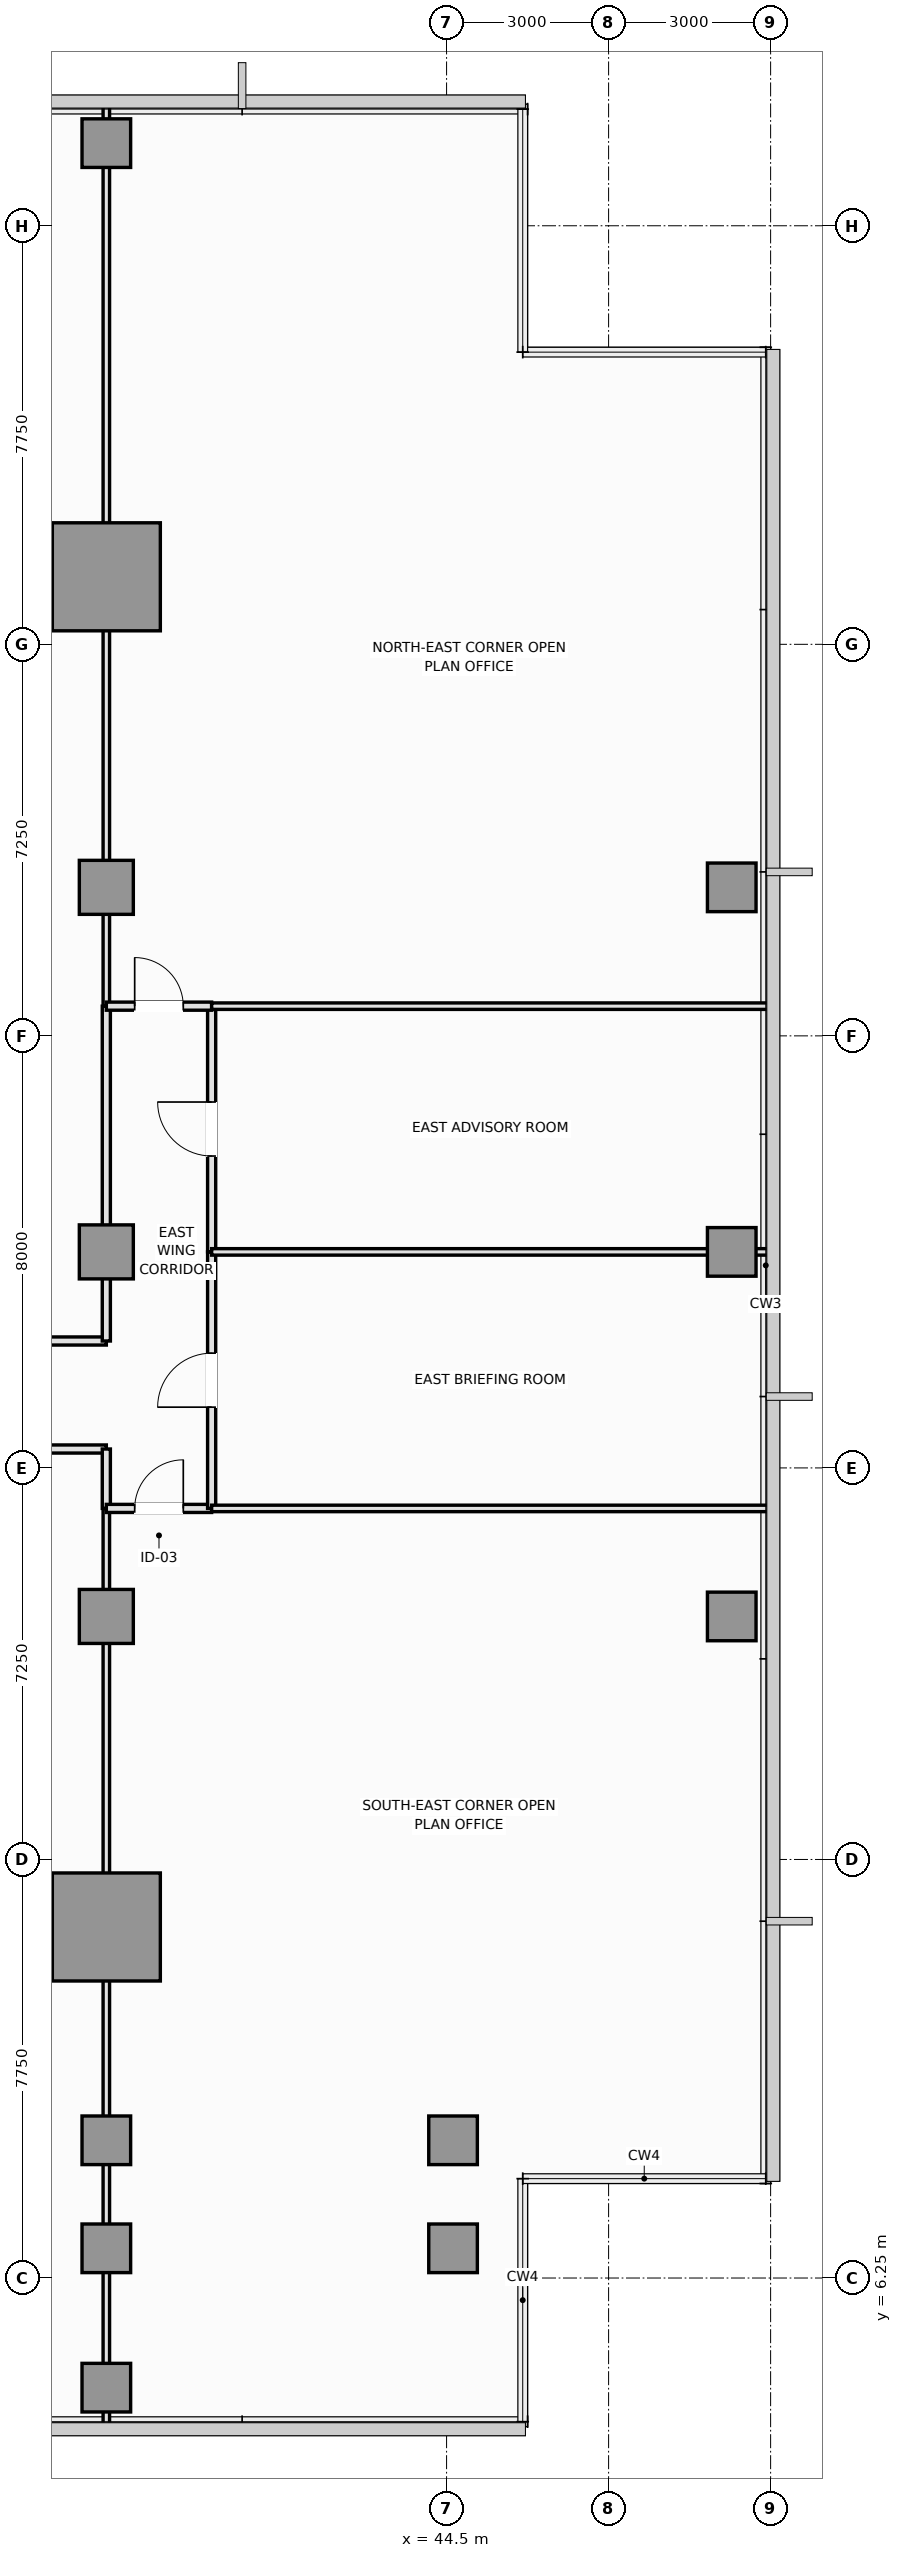
"""IFC4 building model, lengths in metres.
Left out: names, types, materials, properties, quantities, classifications, styles, units other than length and angle.
Written with IfcOpenShell. Run it as: python <this file> out.ifc"""

import sys

from ifc_helpers import new_model, si_unit, direction, frame, frame_2d, origin, origin_2d, place, context, subcontext, project, spatial, rectangle, extrude, element, fill, save


model = new_model("IFC4")
c1 = context("Model", 3, precision=1e-05, world=origin(), true_north=direction((0.0, 1.0)))
c2 = subcontext(c1, "Body", "Model", "MODEL_VIEW")
j1 = project(units=[si_unit("LENGTHUNIT", "METRE"), si_unit("PLANEANGLEUNIT", "RADIAN")], contexts=[c1])
p1 = place(None, origin())
s1 = spatial("IfcSite", under=j1, at=p1, CompositionType="ELEMENT")
p2 = place(p1, origin())
s2 = spatial("IfcBuilding", under=s1, at=p2, CompositionType="ELEMENT")
p3 = place(p2, frame((0.0, 0.0, 169.7)))
s3 = spatial("IfcBuildingStorey", under=s2, at=p3, CompositionType="ELEMENT", Elevation=169.7)
for number, where, z_axis, x_axis in (
    (1, (38.2, 12.75, 0.0), (0.0, 0.0, 1.0), (1.0, 0.0, 0.0)),
    (2, (38.2, 37.75, 0.0), (0.0, 0.0, 1.0), (1.0, 0.0, 0.0)),
):
    element("IfcColumn", number, at=place(p3, frame(where, z_axis=z_axis, x_axis=x_axis)), inside=s3, PredefinedType="COLUMN", context=c2, shape_type="SweptSolid", body=[
        extrude(rectangle(XDim=2.0, YDim=2.0, at=origin_2d()), origin(), (0.0, 0.0, 1.0), 3.55),
    ])
for number, where, z_axis, x_axis in (
    (3, (38.2, 18.5, 0.0), (0.0, 0.0, 1.0), (1.0, 0.0, 0.0)),
    (4, (38.2, 25.25, 0.0), (0.0, 0.0, 1.0), (1.0, 0.0, 0.0)),
    (5, (38.2, 32.0, 0.0), (0.0, 0.0, 1.0), (1.0, 0.0, 0.0)),
):
    element("IfcColumn", number, at=place(p3, frame(where, z_axis=z_axis, x_axis=x_axis)), inside=s3, PredefinedType="COLUMN", context=c2, shape_type="SweptSolid", body=[
        extrude(rectangle(XDim=1.0, YDim=1.0, at=origin_2d()), origin(), (0.0, 0.0, 1.0), 3.55),
    ])
for number, where, z_axis, x_axis in (
    (6, (38.2, 6.8, 0.0), (0.0, 0.0, 1.0), (1.0, 0.0, 0.0)),
    (7, (38.2, 8.8, 0.0), (0.0, 0.0, 1.0), (1.0, 0.0, 0.0)),
    (8, (44.62, 6.8, 0.0), (0.0, 0.0, 1.0), (1.0, 0.0, 0.0)),
    (9, (44.62, 8.8, 0.0), (0.0, 0.0, 1.0), (1.0, 0.0, 0.0)),
    (10, (49.78, 18.5, 0.0), (0.0, 0.0, 1.0), (1.0, 0.0, 0.0)),
    (11, (49.78, 25.25, 0.0), (0.0, 0.0, 1.0), (1.0, 0.0, 0.0)),
    (12, (49.78, 32.0, 0.0), (0.0, 0.0, 1.0), (1.0, 0.0, 0.0)),
    (13, (38.2, 4.22, 0.0), (0.0, 0.0, 1.0), (1.0, 0.0, 0.0)),
    (14, (38.2, 45.78, 0.0), (0.0, 0.0, 1.0), (1.0, 0.0, 0.0)),
):
    element("IfcColumn", number, at=place(p3, frame(where, z_axis=z_axis, x_axis=x_axis)), inside=s3, PredefinedType="COLUMN", context=c2, shape_type="SweptSolid", body=[
        extrude(rectangle(XDim=0.9, YDim=0.9, at=origin_2d()), origin(), (0.0, 0.0, 1.0), 3.55),
    ])
p4 = place(p3, frame((27.5, 21.6, 0.0), z_axis=(0.0, 0.0, 1.0), x_axis=(1.0, 0.0, 0.0)))
e15 = element("IfcWall", 15, at=p4, inside=s3, PredefinedType="PARTITIONING", context=c2, shape_type="SweptSolid", body=[
    extrude(rectangle(XDim=10.7, YDim=0.15, at=frame_2d((5.35, 0.0))), origin(), (0.0, 0.0, 1.0), 3.35),
])
p5 = place(p4, frame((4.85, 0.0, 0.0)))
e16 = element("IfcOpeningElement", 16, at=p5, cuts=e15, PredefinedType="OPENING", context=c2, shape_type="SweptSolid", body=[
    extrude(rectangle(XDim=1.0, YDim=2.15, at=frame_2d((0.5, 1.075))), frame((0.0, 0.085, 0.0), z_axis=(0.0, -1.0, 0.0), x_axis=(1.0, 0.0, 0.0)), (0.0, 0.0, 1.0), 0.17),
])
p6 = place(p3, frame((32.8, 23.6, 0.0), z_axis=(0.0, 0.0, 1.0), x_axis=(1.0, 0.0, 0.0)))
e17 = element("IfcWall", 17, at=p6, inside=s3, PredefinedType="PARTITIONING", context=c2, shape_type="SweptSolid", body=[
    extrude(rectangle(XDim=5.4, YDim=0.15, at=frame_2d((2.7, 0.0))), origin(), (0.0, 0.0, 1.0), 3.35),
])
p7 = place(p6, frame((2.2, 0.0, 0.0)))
e18 = element("IfcOpeningElement", 18, at=p7, cuts=e17, PredefinedType="OPENING", context=c2, shape_type="SweptSolid", body=[
    extrude(rectangle(XDim=1.0, YDim=2.15, at=frame_2d((0.5, 1.075))), frame((0.0, 0.085, 0.0), z_axis=(0.0, -1.0, 0.0), x_axis=(1.0, 0.0, 0.0)), (0.0, 0.0, 1.0), 0.17),
])
p8 = place(p3, frame((38.2, 20.5, 0.0), z_axis=(0.0, 0.0, 1.0), x_axis=(0.0, 1.0, 0.0)))
e19 = element("IfcWall", 19, at=p8, inside=s3, PredefinedType="PARTITIONING", context=c2, shape_type="SweptSolid", body=[
    extrude(rectangle(XDim=1.1, YDim=0.15, at=frame_2d((0.55, 0.0))), origin(), (0.0, 0.0, 1.0), 2.85),
])
p9 = place(p3, frame((38.2, 3.51, 0.0), z_axis=(0.0, 0.0, 1.0), x_axis=(0.0, 1.0, 0.0)))
e20 = element("IfcWall", 20, at=p9, inside=s3, PredefinedType="PARTITIONING", context=c2, shape_type="SweptSolid", body=[
    extrude(rectangle(XDim=16.99, YDim=0.12, at=frame_2d((8.495, 0.0))), origin(), (0.0, 0.0, 1.0), 2.85),
])
p10 = place(p3, frame((38.2, 23.6, 0.0), z_axis=(0.0, 0.0, 1.0), x_axis=(0.0, 1.0, 0.0)))
e21 = element("IfcWall", 21, at=p10, inside=s3, PredefinedType="PARTITIONING", context=c2, shape_type="SweptSolid", body=[
    extrude(rectangle(XDim=6.2, YDim=0.15, at=frame_2d((3.1, 0.0))), origin(), (0.0, 0.0, 1.0), 2.85),
])
p11 = place(p3, frame((38.2, 29.8, 0.0), z_axis=(0.0, 0.0, 1.0), x_axis=(0.0, 1.0, 0.0)))
e22 = element("IfcWall", 22, at=p11, inside=s3, PredefinedType="PARTITIONING", context=c2, shape_type="SweptSolid", body=[
    extrude(rectangle(XDim=16.69, YDim=0.12, at=frame_2d((8.345, 0.0))), origin(), (0.0, 0.0, 1.0), 2.85),
])
p12 = place(p3, frame((38.2, 20.5, 0.0), z_axis=(0.0, 0.0, 1.0), x_axis=(1.0, 0.0, 0.0)))
e23 = element("IfcWall", 23, at=p12, inside=s3, PredefinedType="PARTITIONING", context=c2, shape_type="SweptSolid", body=[
    extrude(rectangle(XDim=1.95, YDim=0.15, at=frame_2d((0.975, 0.0))), origin(), (0.0, 0.0, 1.0), 3.35),
])
p13 = place(p12, frame((0.525, 0.0, 0.0)))
e24 = element("IfcOpeningElement", 24, at=p13, cuts=e23, PredefinedType="OPENING", context=c2, shape_type="SweptSolid", body=[
    extrude(rectangle(XDim=0.9, YDim=2.1, at=frame_2d((0.45, 1.05))), frame((0.0, 0.085, 0.0), z_axis=(0.0, -1.0, 0.0), x_axis=(1.0, 0.0, 0.0)), (0.0, 0.0, 1.0), 0.17),
])
p14 = place(p3, frame((40.15, 20.5, 0.0), z_axis=(0.0, 0.0, 1.0), x_axis=(0.0, 1.0, 0.0)))
e25 = element("IfcWall", 25, at=p14, inside=s3, PredefinedType="PARTITIONING", context=c2, shape_type="SweptSolid", body=[
    extrude(rectangle(XDim=4.75, YDim=0.15, at=frame_2d((2.375, 0.0))), origin(), (0.0, 0.0, 1.0), 3.35),
])
p15 = place(p14, frame((1.875, 0.0, 0.0)))
e26 = element("IfcOpeningElement", 26, at=p15, cuts=e25, PredefinedType="OPENING", context=c2, shape_type="SweptSolid", body=[
    extrude(rectangle(XDim=1.0, YDim=2.15, at=frame_2d((0.5, 1.075))), frame((0.0, 0.085, 0.0), z_axis=(0.0, -1.0, 0.0), x_axis=(1.0, 0.0, 0.0)), (0.0, 0.0, 1.0), 0.17),
])
p16 = place(p3, frame((40.15, 25.25, 0.0), z_axis=(0.0, 0.0, 1.0), x_axis=(0.0, 1.0, 0.0)))
e27 = element("IfcWall", 27, at=p16, inside=s3, PredefinedType="PARTITIONING", context=c2, shape_type="SweptSolid", body=[
    extrude(rectangle(XDim=4.55, YDim=0.15, at=frame_2d((2.275, 0.0))), origin(), (0.0, 0.0, 1.0), 3.35),
])
p17 = place(p16, frame((1.775, 0.0, 0.0)))
e28 = element("IfcOpeningElement", 28, at=p17, cuts=e27, PredefinedType="OPENING", context=c2, shape_type="SweptSolid", body=[
    extrude(rectangle(XDim=1.0, YDim=2.15, at=frame_2d((0.5, 1.075))), frame((0.0, 0.085, 0.0), z_axis=(0.0, -1.0, 0.0), x_axis=(1.0, 0.0, 0.0)), (0.0, 0.0, 1.0), 0.17),
])
p18 = place(p3, frame((38.2, 29.8, 0.0), z_axis=(0.0, 0.0, 1.0), x_axis=(1.0, 0.0, 0.0)))
e29 = element("IfcWall", 29, at=p18, inside=s3, PredefinedType="PARTITIONING", context=c2, shape_type="SweptSolid", body=[
    extrude(rectangle(XDim=1.95, YDim=0.15, at=frame_2d((0.975, 0.0))), origin(), (0.0, 0.0, 1.0), 3.35),
])
p19 = place(p18, frame((0.525, 0.0, 0.0)))
e30 = element("IfcOpeningElement", 30, at=p19, cuts=e29, PredefinedType="OPENING", context=c2, shape_type="SweptSolid", body=[
    extrude(rectangle(XDim=0.9, YDim=2.1, at=frame_2d((0.45, 1.05))), frame((0.0, 0.085, 0.0), z_axis=(0.0, -1.0, 0.0), x_axis=(1.0, 0.0, 0.0)), (0.0, 0.0, 1.0), 0.17),
])
p20 = place(p3, frame((40.15, 20.5, 0.0), z_axis=(0.0, 0.0, 1.0), x_axis=(1.0, 0.0, 0.0)))
e31 = element("IfcWall", 31, at=p20, inside=s3, PredefinedType="PARTITIONING", context=c2, shape_type="SweptSolid", body=[
    extrude(rectangle(XDim=10.34, YDim=0.12, at=frame_2d((5.17, 0.0))), origin(), (0.0, 0.0, 1.0), 3.35),
])
p21 = place(p3, frame((40.15, 25.25, 0.0), z_axis=(0.0, 0.0, 1.0), x_axis=(1.0, 0.0, 0.0)))
e32 = element("IfcWall", 32, at=p21, inside=s3, PredefinedType="PARTITIONING", context=c2, shape_type="SweptSolid", body=[
    extrude(rectangle(XDim=10.34, YDim=0.12, at=frame_2d((5.17, 0.0))), origin(), (0.0, 0.0, 1.0), 2.75),
])
p22 = place(p3, frame((40.15, 29.8, 0.0), z_axis=(0.0, 0.0, 1.0), x_axis=(1.0, 0.0, 0.0)))
e33 = element("IfcWall", 33, at=p22, inside=s3, PredefinedType="PARTITIONING", context=c2, shape_type="SweptSolid", body=[
    extrude(rectangle(XDim=10.34, YDim=0.12, at=frame_2d((5.17, 0.0))), origin(), (0.0, 0.0, 1.0), 3.35),
])
p23 = place(p13, origin())
e34 = element("IfcDoor", 34, at=p23, inside=s3, OperationType="SINGLE_SWING_RIGHT", PredefinedType="DOOR", context=c2, shape_type="SweptSolid", body=[
    extrude(rectangle(XDim=0.9, YDim=2.1, at=frame_2d((0.45, 1.05))), frame((0.0, 0.025, 0.0), z_axis=(0.0, -1.0, 0.0), x_axis=(1.0, 0.0, 0.0)), (0.0, 0.0, 1.0), 0.05),
])
fill(e24, e34)
p24 = place(p15, origin())
e35 = element("IfcDoor", 35, at=p24, inside=s3, OperationType="SINGLE_SWING_LEFT", PredefinedType="DOOR", context=c2, shape_type="SweptSolid", body=[
    extrude(rectangle(XDim=1.0, YDim=2.15, at=frame_2d((0.5, 1.075))), frame((0.0, 0.025, 0.0), z_axis=(0.0, -1.0, 0.0), x_axis=(1.0, 0.0, 0.0)), (0.0, 0.0, 1.0), 0.05),
])
fill(e26, e35)
p25 = place(p17, origin())
e36 = element("IfcDoor", 36, at=p25, inside=s3, OperationType="SINGLE_SWING_RIGHT", PredefinedType="DOOR", context=c2, shape_type="SweptSolid", body=[
    extrude(rectangle(XDim=1.0, YDim=2.15, at=frame_2d((0.5, 1.075))), frame((0.0, 0.025, 0.0), z_axis=(0.0, -1.0, 0.0), x_axis=(1.0, 0.0, 0.0)), (0.0, 0.0, 1.0), 0.05),
])
fill(e28, e36)
p26 = place(p19, origin())
e37 = element("IfcDoor", 37, at=p26, inside=s3, OperationType="SINGLE_SWING_LEFT", PredefinedType="DOOR", context=c2, shape_type="SweptSolid", body=[
    extrude(rectangle(XDim=0.9, YDim=2.1, at=frame_2d((0.45, 1.05))), frame((0.0, 0.025, 0.0), z_axis=(0.0, -1.0, 0.0), x_axis=(1.0, 0.0, 0.0)), (0.0, 0.0, 1.0), 0.05),
])
fill(e30, e37)
save(model, sys.argv[1])
